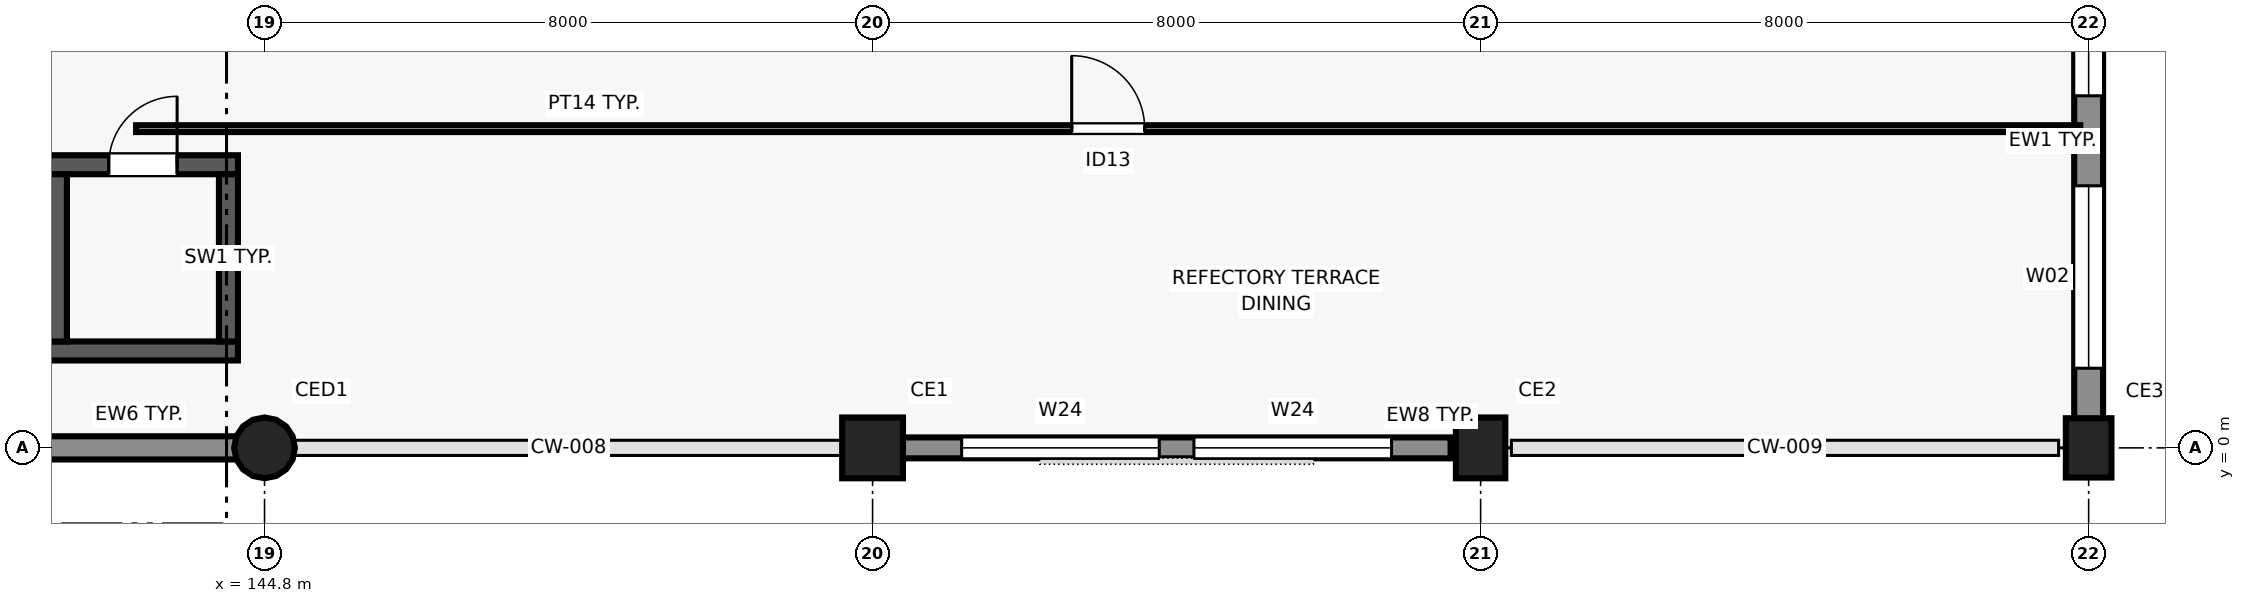
"""IFC4 building model, lengths in metres.
Left out: names, types, materials, properties, quantities, classifications, styles, units other than length and angle.
Written with IfcOpenShell. Run it as: python <this file> out.ifc"""

import sys

from ifc_helpers import new_model, si_unit, direction, frame, frame_2d, origin, origin_2d, place, context, subcontext, project, spatial, rectangle, circle, extrude, element, fill, save


model = new_model("IFC4")
c1 = context("Model", 3, precision=1e-05, world=origin(), true_north=direction((0.0, 1.0)))
c2 = subcontext(c1, "Body", "Model", "MODEL_VIEW")
j1 = project(units=[si_unit("LENGTHUNIT", "METRE"), si_unit("PLANEANGLEUNIT", "RADIAN")], contexts=[c1])
p1 = place(None, origin())
s1 = spatial("IfcSite", under=j1, at=p1, CompositionType="ELEMENT")
p2 = place(p1, origin())
s2 = spatial("IfcBuilding", under=s1, at=p2, CompositionType="ELEMENT")
p3 = place(p2, origin())
s3 = spatial("IfcBuildingStorey", under=s2, at=p3, CompositionType="ELEMENT", Elevation=0.0)
p4 = place(p3, frame((144.8, 0.0, 0.0), z_axis=(0.0, 0.0, 1.0), x_axis=(1.0, 0.0, 0.0)))
e1 = element("IfcColumn", 1, at=p4, inside=s3, PredefinedType="COLUMN", context=c2, shape_type="SweptSolid", body=[
    extrude(circle(Radius=0.4, at=origin_2d()), origin(), (0.0, 0.0, 1.0), 4.5),
])
p5 = place(p3, frame((152.8, 0.0, 0.0), z_axis=(0.0, 0.0, 1.0), x_axis=(1.0, 0.0, 0.0)))
e2 = element("IfcColumn", 2, at=p5, inside=s3, PredefinedType="COLUMN", context=c2, shape_type="SweptSolid", body=[
    extrude(rectangle(XDim=0.8, YDim=0.8, at=origin_2d()), origin(), (0.0, 0.0, 1.0), 4.5),
])
p6 = place(p3, frame((160.8, 0.0, 0.0), z_axis=(0.0, 0.0, 1.0), x_axis=(1.0, 0.0, 0.0)))
e3 = element("IfcColumn", 3, at=p6, inside=s3, PredefinedType="COLUMN", context=c2, shape_type="SweptSolid", body=[
    extrude(rectangle(XDim=0.8, YDim=0.65, at=origin_2d()), origin(), (0.0, 0.0, 1.0), 4.5),
])
p7 = place(p3, frame((168.8, 0.0, 0.0), z_axis=(0.0, 0.0, 1.0), x_axis=(1.0, 0.0, 0.0)))
e4 = element("IfcColumn", 4, at=p7, inside=s3, PredefinedType="COLUMN", context=c2, shape_type="SweptSolid", body=[
    extrude(rectangle(XDim=0.78, YDim=0.6, at=origin_2d()), origin(), (0.0, 0.0, 1.0), 4.5),
])
p8 = place(p3, frame((137.185, 0.0, 0.0), z_axis=(0.0, 0.0, 1.0), x_axis=(1.0, 0.0, 0.0)))
e5 = element("IfcWall", 5, at=p8, inside=s3, PredefinedType="SOLIDWALL", context=c2, shape_type="SweptSolid", body=[
    extrude(rectangle(XDim=7.279, YDim=0.305, at=frame_2d((3.64, 0.0))), origin(), (0.0, 0.0, 1.0), 4.22),
])
p9 = place(p8, frame((1.412, 0.0, 0.9)))
e6 = element("IfcOpeningElement", 6, at=p9, cuts=e5, PredefinedType="OPENING", context=c2, shape_type="SweptSolid", body=[
    extrude(rectangle(XDim=0.95, YDim=1.25, at=frame_2d((0.475, 0.625))), frame((0.0, 0.162, 0.0), z_axis=(0.0, -1.0, 0.0), x_axis=(1.0, 0.0, 0.0)), (0.0, 0.0, 1.0), 0.325),
])
p10 = place(p8, frame((3.453, 0.0, 0.9)))
e7 = element("IfcOpeningElement", 7, at=p10, cuts=e5, PredefinedType="OPENING", context=c2, shape_type="SweptSolid", body=[
    extrude(rectangle(XDim=0.95, YDim=1.25, at=frame_2d((0.475, 0.625))), frame((0.0, 0.162, 0.0), z_axis=(0.0, -1.0, 0.0), x_axis=(1.0, 0.0, 0.0)), (0.0, 0.0, 1.0), 0.325),
])
p11 = place(p3, frame((153.195, 0.0, 0.0), z_axis=(0.0, 0.0, 1.0), x_axis=(1.0, 0.0, 0.0)))
e8 = element("IfcWall", 8, at=p11, inside=s3, PredefinedType="SOLIDWALL", context=c2, shape_type="SweptSolid", body=[
    extrude(rectangle(XDim=7.21, YDim=0.275, at=frame_2d((3.605, 0.0))), origin(), (0.0, 0.0, 1.0), 3.62),
])
p12 = place(p11, frame((0.777, 0.0, 0.9)))
e9 = element("IfcOpeningElement", 9, at=p12, cuts=e8, PredefinedType="OPENING", context=c2, shape_type="SweptSolid", body=[
    extrude(rectangle(XDim=2.6, YDim=1.65, at=frame_2d((1.3, 0.825))), frame((0.0, 0.147, 0.0), z_axis=(0.0, -1.0, 0.0), x_axis=(1.0, 0.0, 0.0)), (0.0, 0.0, 1.0), 0.295),
])
p13 = place(p11, frame((3.833, 0.0, 0.9)))
e10 = element("IfcOpeningElement", 10, at=p13, cuts=e8, PredefinedType="OPENING", context=c2, shape_type="SweptSolid", body=[
    extrude(rectangle(XDim=2.6, YDim=1.65, at=frame_2d((1.3, 0.825))), frame((0.0, 0.147, 0.0), z_axis=(0.0, -1.0, 0.0), x_axis=(1.0, 0.0, 0.0)), (0.0, 0.0, 1.0), 0.295),
])
p14 = place(p3, frame((168.8, 0.295, 0.0), z_axis=(0.0, 0.0, 1.0), x_axis=(0.0, 1.0, 0.0)))
e11 = element("IfcWall", 11, at=p14, inside=s3, PredefinedType="SOLIDWALL", context=c2, shape_type="SweptSolid", body=[
    extrude(rectangle(XDim=6.969, YDim=0.38, at=frame_2d((3.484, 0.0))), origin(), (0.0, 0.0, 1.0), 3.78),
])
p15 = place(p14, frame((0.753, 0.0, 0.9)))
e12 = element("IfcOpeningElement", 12, at=p15, cuts=e11, PredefinedType="OPENING", context=c2, shape_type="SweptSolid", body=[
    extrude(rectangle(XDim=2.4, YDim=1.8, at=frame_2d((1.2, 0.9))), frame((0.0, 0.2, 0.0), z_axis=(0.0, -1.0, 0.0), x_axis=(1.0, 0.0, 0.0)), (0.0, 0.0, 1.0), 0.4),
])
p16 = place(p14, frame((4.337, 0.0, 0.9)))
e13 = element("IfcOpeningElement", 13, at=p16, cuts=e11, PredefinedType="OPENING", context=c2, shape_type="SweptSolid", body=[
    extrude(rectangle(XDim=2.2, YDim=1.8, at=frame_2d((1.1, 0.9))), frame((0.0, 0.2, 0.0), z_axis=(0.0, -1.0, 0.0), x_axis=(1.0, 0.0, 0.0)), (0.0, 0.0, 1.0), 0.4),
])
p17 = place(p3, frame((141.95, 1.275, 0.0), z_axis=(0.0, 0.0, 1.0), x_axis=(1.0, 0.0, 0.0)))
e14 = element("IfcWall", 14, at=p17, inside=s3, PredefinedType="SHEAR", context=c2, shape_type="SweptSolid", body=[
    extrude(rectangle(XDim=2.5, YDim=0.25, at=frame_2d((1.25, 0.0))), origin(), (0.0, 0.0, 1.0), 4.22),
])
p18 = place(p3, frame((141.95, 3.725, 0.0), z_axis=(0.0, 0.0, 1.0), x_axis=(1.0, 0.0, 0.0)))
e15 = element("IfcWall", 15, at=p18, inside=s3, PredefinedType="SHEAR", context=c2, shape_type="SweptSolid", body=[
    extrude(rectangle(XDim=2.5, YDim=0.25, at=frame_2d((1.25, 0.0))), origin(), (0.0, 0.0, 1.0), 4.22),
])
p19 = place(p18, frame((0.8, 0.0, 0.0)))
e16 = element("IfcOpeningElement", 16, at=p19, cuts=e15, PredefinedType="OPENING", context=c2, shape_type="SweptSolid", body=[
    extrude(rectangle(XDim=0.9, YDim=2.05, at=frame_2d((0.45, 1.025))), frame((0.0, 0.135, 0.0), z_axis=(0.0, -1.0, 0.0), x_axis=(1.0, 0.0, 0.0)), (0.0, 0.0, 1.0), 0.27),
])
for number, where, z_axis, x_axis in (
    (17, (142.075, 1.4, 0.0), (0.0, 0.0, 1.0), (0.0, 1.0, 0.0)),
    (18, (144.325, 1.4, 0.0), (0.0, 0.0, 1.0), (0.0, 1.0, 0.0)),
):
    element("IfcWall", number, at=place(p3, frame(where, z_axis=z_axis, x_axis=x_axis)), inside=s3, PredefinedType="SHEAR", context=c2, shape_type="SweptSolid", body=[
        extrude(rectangle(XDim=2.2, YDim=0.25, at=frame_2d((1.1, 0.0))), origin(), (0.0, 0.0, 1.0), 4.22),
    ])
p20 = place(p3, frame((143.11, 4.2, 0.0), z_axis=(0.0, 0.0, 1.0), x_axis=(1.0, 0.0, 0.0)))
e19 = element("IfcWall", 19, at=p20, inside=s3, PredefinedType="PARTITIONING", context=c2, shape_type="SweptSolid", body=[
    extrude(rectangle(XDim=25.58, YDim=0.09, at=frame_2d((12.79, 0.0))), origin(), (0.0, 0.0, 1.0), 4.2),
])
p21 = place(p20, frame((12.31, 0.0, 0.0)))
e20 = element("IfcOpeningElement", 20, at=p21, cuts=e19, PredefinedType="OPENING", context=c2, shape_type="SweptSolid", body=[
    extrude(rectangle(XDim=0.96, YDim=2.15, at=frame_2d((0.48, 1.075))), frame((0.0, 0.055, 0.0), z_axis=(0.0, -1.0, 0.0), x_axis=(1.0, 0.0, 0.0)), (0.0, 0.0, 1.0), 0.11),
])
p22 = place(p12, origin())
e21 = element("IfcWindow", 21, at=p22, inside=s3, PartitioningType="SINGLE_PANEL", PredefinedType="WINDOW", context=c2, shape_type="SweptSolid", body=[
    extrude(rectangle(XDim=2.6, YDim=1.65, at=frame_2d((1.3, 0.825))), frame((0.0, 0.03, 0.0), z_axis=(0.0, -1.0, 0.0), x_axis=(1.0, 0.0, 0.0)), (0.0, 0.0, 1.0), 0.06),
])
fill(e9, e21)
p23 = place(p13, origin())
e22 = element("IfcWindow", 22, at=p23, inside=s3, PartitioningType="SINGLE_PANEL", PredefinedType="WINDOW", context=c2, shape_type="SweptSolid", body=[
    extrude(rectangle(XDim=2.6, YDim=1.65, at=frame_2d((1.3, 0.825))), frame((0.0, 0.03, 0.0), z_axis=(0.0, -1.0, 0.0), x_axis=(1.0, 0.0, 0.0)), (0.0, 0.0, 1.0), 0.06),
])
fill(e10, e22)
p24 = place(p15, origin())
e23 = element("IfcWindow", 23, at=p24, inside=s3, PartitioningType="SINGLE_PANEL", PredefinedType="WINDOW", context=c2, shape_type="SweptSolid", body=[
    extrude(rectangle(XDim=2.4, YDim=1.8, at=frame_2d((1.2, 0.9))), frame((0.0, 0.03, 0.0), z_axis=(0.0, -1.0, 0.0), x_axis=(1.0, 0.0, 0.0)), (0.0, 0.0, 1.0), 0.06),
])
fill(e12, e23)
p25 = place(p16, origin())
e24 = element("IfcWindow", 24, at=p25, inside=s3, PartitioningType="SINGLE_PANEL", PredefinedType="WINDOW", context=c2, shape_type="SweptSolid", body=[
    extrude(rectangle(XDim=2.2, YDim=1.8, at=frame_2d((1.1, 0.9))), frame((0.0, 0.03, 0.0), z_axis=(0.0, -1.0, 0.0), x_axis=(1.0, 0.0, 0.0)), (0.0, 0.0, 1.0), 0.06),
])
fill(e13, e24)
p26 = place(p19, origin())
e25 = element("IfcDoor", 25, at=p26, inside=s3, OperationType="SINGLE_SWING_RIGHT", PredefinedType="DOOR", context=c2, shape_type="SweptSolid", body=[
    extrude(rectangle(XDim=0.9, YDim=2.05, at=frame_2d((0.45, 1.025))), frame((0.0, 0.025, 0.0), z_axis=(0.0, -1.0, 0.0), x_axis=(1.0, 0.0, 0.0)), (0.0, 0.0, 1.0), 0.05),
])
fill(e16, e25)
p27 = place(p21, origin())
e26 = element("IfcDoor", 26, at=p27, inside=s3, OperationType="SINGLE_SWING_LEFT", PredefinedType="DOOR", context=c2, shape_type="SweptSolid", body=[
    extrude(rectangle(XDim=0.96, YDim=2.15, at=frame_2d((0.48, 1.075))), frame((0.0, 0.025, 0.0), z_axis=(0.0, -1.0, 0.0), x_axis=(1.0, 0.0, 0.0)), (0.0, 0.0, 1.0), 0.05),
])
fill(e20, e26)
save(model, sys.argv[1])
